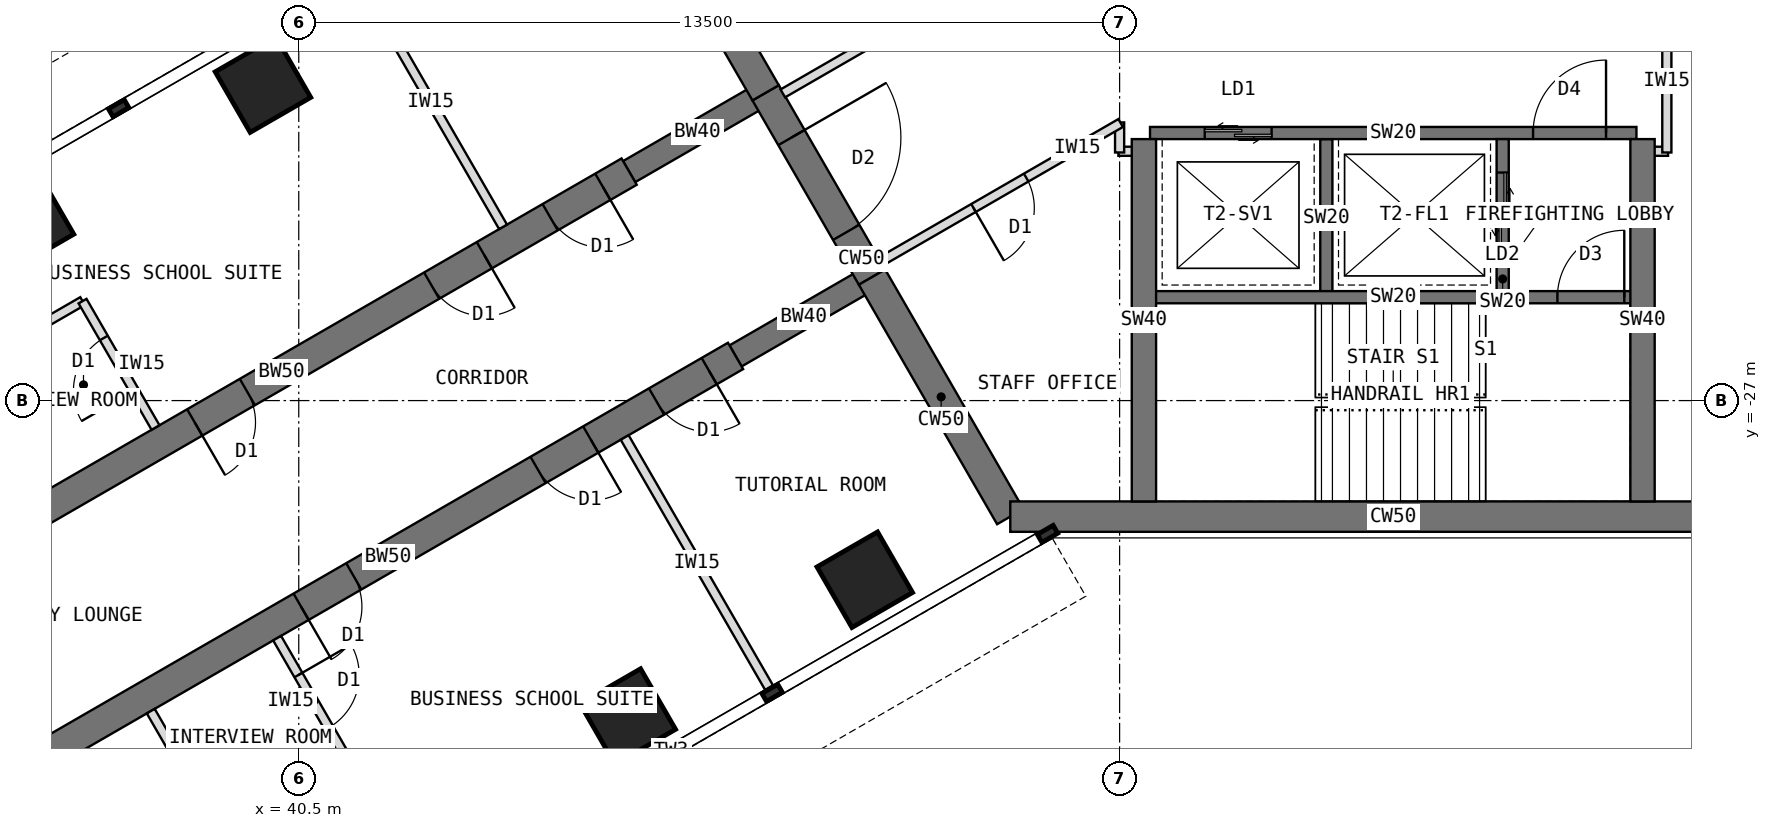
"""IFC4 building model, lengths in metres.
Left out: names, types, materials, properties, quantities, classifications, styles, units other than length and angle.
Written with IfcOpenShell. Run it as: python <this file> out.ifc"""

import sys

from ifc_helpers import new_model, si_unit, direction, frame, frame_2d, origin, origin_2d, place, context, subcontext, project, spatial, rectangle, extrude, element, fill, save


model = new_model("IFC4")
c1 = context("Model", 3, precision=1e-05, world=origin(), true_north=direction((0.0, 1.0)))
c2 = subcontext(c1, "Body", "Model", "MODEL_VIEW")
j1 = project(units=[si_unit("LENGTHUNIT", "METRE"), si_unit("PLANEANGLEUNIT", "RADIAN")], contexts=[c1])
p1 = place(None, origin())
s1 = spatial("IfcSite", under=j1, at=p1, CompositionType="ELEMENT")
p2 = place(p1, origin())
s2 = spatial("IfcBuilding", under=s1, at=p2, CompositionType="ELEMENT")
p3 = place(p2, frame((0.0, 0.0, 194.5)))
s3 = spatial("IfcBuildingStorey", under=s2, at=p3, CompositionType="ELEMENT", Elevation=194.5)
p4 = place(p3, frame((45.904, -18.0, 0.0), z_axis=(0.0, 0.0, 1.0), x_axis=(0.500024481964, -0.866011268655, 0.0)))
e1 = element("IfcWall", 1, at=p4, inside=s3, PredefinedType="SHEAR", context=c2, shape_type="SweptSolid", body=[
    extrude(rectangle(XDim=4.548, YDim=0.5, at=frame_2d((2.274, 0.0))), origin(), (0.0, 0.0, 1.0), 4.0),
])
p5 = place(p3, frame((48.178, -21.939, 0.0), z_axis=(0.0, 0.0, 1.0), x_axis=(0.500010275428, -0.866019471182, 0.0)))
e2 = element("IfcWall", 2, at=p5, inside=s3, PredefinedType="SHEAR", context=c2, shape_type="SweptSolid", body=[
    extrude(rectangle(XDim=3.5, YDim=0.5, at=frame_2d((1.75, 0.0))), origin(), (0.0, 0.0, 1.0), 4.0),
])
p6 = place(p5, frame((0.85, 0.0, 0.0)))
e3 = element("IfcOpeningElement", 3, at=p6, cuts=e2, PredefinedType="OPENING", context=c2, shape_type="SweptSolid", body=[
    extrude(rectangle(XDim=1.8, YDim=2.1, at=frame_2d((0.9, 1.05))), frame((0.0, 0.26, 0.0), z_axis=(0.0, -1.0, 0.0), x_axis=(1.0, 0.0, 0.0)), (0.0, 0.0, 1.0), 0.52),
])
p7 = place(p3, frame((49.928, -24.97, 0.0), z_axis=(0.0, 0.0, 1.0), x_axis=(0.499984222037, -0.866034513004, 0.0)))
e4 = element("IfcWall", 4, at=p7, inside=s3, PredefinedType="SHEAR", context=c2, shape_type="SweptSolid", body=[
    extrude(rectangle(XDim=4.548, YDim=0.5, at=frame_2d((2.274, 0.0))), origin(), (0.0, 0.0, 1.0), 4.0),
])
p8 = place(p3, frame((52.202, -28.908, 0.0), z_axis=(0.0, 0.0, 1.0), x_axis=(1.0, 0.0, 0.0)))
e5 = element("IfcWall", 5, at=p8, inside=s3, PredefinedType="SHEAR", context=c2, shape_type="SweptSolid", body=[
    extrude(rectangle(XDim=12.596, YDim=0.5, at=frame_2d((6.298, 0.0))), origin(), (0.0, 0.0, 1.0), 4.0),
])
p9 = place(p3, frame((49.928, -24.97, 0.0), z_axis=(0.0, 0.0, 1.0), x_axis=(-0.866031863473, -0.499988811324, 0.0)))
e6 = element("IfcWall", 6, at=p9, inside=s3, PredefinedType="SHEAR", context=c2, shape_type="SweptSolid", body=[
    extrude(rectangle(XDim=2.592, YDim=0.4, at=frame_2d((1.296, 0.0))), origin(), (0.0, 0.0, 1.0), 4.0),
])
p10 = place(p3, frame((47.684, -26.266, 0.0), z_axis=(0.0, 0.0, 1.0), x_axis=(-0.866027579429, -0.499996231654, 0.0)))
e7 = element("IfcWall", 7, at=p10, inside=s3, PredefinedType="SHEAR", context=c2, shape_type="SweptSolid", body=[
    extrude(rectangle(XDim=13.2, YDim=0.5, at=frame_2d((6.6, 0.0))), origin(), (0.0, 0.0, 1.0), 4.0),
])
p11 = place(p10, frame((0.5, 0.0, 0.0)))
e8 = element("IfcOpeningElement", 8, at=p11, cuts=e7, PredefinedType="OPENING", context=c2, shape_type="SweptSolid", body=[
    extrude(rectangle(XDim=1.0, YDim=2.1, at=frame_2d((0.5, 1.05))), frame((0.0, 0.26, 0.0), z_axis=(0.0, -1.0, 0.0), x_axis=(1.0, 0.0, 0.0)), (0.0, 0.0, 1.0), 0.52),
])
p12 = place(p10, frame((2.75, 0.0, 0.0)))
e9 = element("IfcOpeningElement", 9, at=p12, cuts=e7, PredefinedType="OPENING", context=c2, shape_type="SweptSolid", body=[
    extrude(rectangle(XDim=1.0, YDim=2.1, at=frame_2d((0.5, 1.05))), frame((0.0, 0.26, 0.0), z_axis=(0.0, -1.0, 0.0), x_axis=(1.0, 0.0, 0.0)), (0.0, 0.0, 1.0), 0.52),
])
p13 = place(p10, frame((7.25, 0.0, 0.0)))
e10 = element("IfcOpeningElement", 10, at=p13, cuts=e7, PredefinedType="OPENING", context=c2, shape_type="SweptSolid", body=[
    extrude(rectangle(XDim=1.0, YDim=2.1, at=frame_2d((0.5, 1.05))), frame((0.0, 0.26, 0.0), z_axis=(0.0, -1.0, 0.0), x_axis=(1.0, 0.0, 0.0)), (0.0, 0.0, 1.0), 0.52),
])
p14 = place(p3, frame((48.178, -21.939, 0.0), z_axis=(0.0, 0.0, 1.0), x_axis=(-0.866072649678, -0.499918158782, 0.0)))
e11 = element("IfcWall", 11, at=p14, inside=s3, PredefinedType="SHEAR", context=c2, shape_type="SweptSolid", body=[
    extrude(rectangle(XDim=2.592, YDim=0.4, at=frame_2d((1.296, 0.0))), origin(), (0.0, 0.0, 1.0), 4.0),
])
p15 = place(p3, frame((45.934, -23.234, 0.0), z_axis=(0.0, 0.0, 1.0), x_axis=(-0.866019570528, -0.500010103361, 0.0)))
e12 = element("IfcWall", 12, at=p15, inside=s3, PredefinedType="SHEAR", context=c2, shape_type="SweptSolid", body=[
    extrude(rectangle(XDim=13.2, YDim=0.5, at=frame_2d((6.6, 0.0))), origin(), (0.0, 0.0, 1.0), 4.0),
])
p16 = place(p15, frame((0.5, 0.0, 0.0)))
e13 = element("IfcOpeningElement", 13, at=p16, cuts=e12, PredefinedType="OPENING", context=c2, shape_type="SweptSolid", body=[
    extrude(rectangle(XDim=1.0, YDim=2.1, at=frame_2d((0.5, 1.05))), frame((0.0, 0.26, 0.0), z_axis=(0.0, -1.0, 0.0), x_axis=(1.0, 0.0, 0.0)), (0.0, 0.0, 1.0), 0.52),
])
p17 = place(p15, frame((2.75, 0.0, 0.0)))
e14 = element("IfcOpeningElement", 14, at=p17, cuts=e12, PredefinedType="OPENING", context=c2, shape_type="SweptSolid", body=[
    extrude(rectangle(XDim=1.0, YDim=2.1, at=frame_2d((0.5, 1.05))), frame((0.0, 0.26, 0.0), z_axis=(0.0, -1.0, 0.0), x_axis=(1.0, 0.0, 0.0)), (0.0, 0.0, 1.0), 0.52),
])
p18 = place(p15, frame((7.25, 0.0, 0.0)))
e15 = element("IfcOpeningElement", 15, at=p18, cuts=e12, PredefinedType="OPENING", context=c2, shape_type="SweptSolid", body=[
    extrude(rectangle(XDim=1.0, YDim=2.1, at=frame_2d((0.5, 1.05))), frame((0.0, 0.26, 0.0), z_axis=(0.0, -1.0, 0.0), x_axis=(1.0, 0.0, 0.0)), (0.0, 0.0, 1.0), 0.52),
])
for number, where, z_axis, x_axis in (
    (16, (49.809, -29.946, 0.0), (0.0, 0.0, 1.0), (0.866, 0.5, 0.0)),
    (17, (45.912, -32.196, 0.0), (0.0, 0.0, 1.0), (0.866, 0.5, 0.0)),
    (18, (39.912, -21.804, 0.0), (0.0, 0.0, 1.0), (0.866, 0.5, 0.0)),
    (19, (36.014, -24.054, 0.0), (0.0, 0.0, 1.0), (0.866, 0.5, 0.0)),
):
    element("IfcColumn", number, at=place(p3, frame(where, z_axis=z_axis, x_axis=x_axis)), inside=s3, PredefinedType="COLUMN", context=c2, shape_type="SweptSolid", body=[
        extrude(rectangle(XDim=1.15, YDim=1.15, at=origin_2d()), origin(), (0.0, 0.0, 1.0), 4.0),
    ])
p19 = place(p3, frame((54.5, -22.6, 0.0), z_axis=(0.0, 0.0, 1.0), x_axis=(1.0, 0.0, 0.0)))
e20 = element("IfcWall", 20, at=p19, inside=s3, PredefinedType="SHEAR", context=c2, shape_type="SweptSolid", body=[
    extrude(rectangle(XDim=8.0, YDim=0.2, at=frame_2d((4.0, 0.0))), origin(), (0.0, 0.0, 1.0), 4.0),
])
p20 = place(p19, frame((6.3, 0.0, 0.0)))
e21 = element("IfcOpeningElement", 21, at=p20, cuts=e20, PredefinedType="OPENING", context=c2, shape_type="SweptSolid", body=[
    extrude(rectangle(XDim=1.2, YDim=2.1, at=frame_2d((0.6, 1.05))), frame((0.0, 0.11, 0.0), z_axis=(0.0, -1.0, 0.0), x_axis=(1.0, 0.0, 0.0)), (0.0, 0.0, 1.0), 0.22),
])
p21 = place(p19, frame((0.9, 0.0, 0.0)))
e22 = element("IfcOpeningElement", 22, at=p21, cuts=e20, PredefinedType="OPENING", context=c2, shape_type="SweptSolid", body=[
    extrude(rectangle(XDim=1.1, YDim=2.2, at=frame_2d((0.55, 1.1))), frame((0.0, 0.11, 0.0), z_axis=(0.0, -1.0, 0.0), x_axis=(1.0, 0.0, 0.0)), (0.0, 0.0, 1.0), 0.22),
])
p22 = place(p3, frame((57.4, -22.7, 0.0), z_axis=(0.0, 0.0, 1.0), x_axis=(0.0, -1.0, 0.0)))
e23 = element("IfcWall", 23, at=p22, inside=s3, PredefinedType="SHEAR", context=c2, shape_type="SweptSolid", body=[
    extrude(rectangle(XDim=2.6, YDim=0.2, at=frame_2d((1.3, 0.0))), origin(), (0.0, 0.0, 1.0), 4.0),
])
p23 = place(p3, frame((60.3, -22.7, 0.0), z_axis=(0.0, 0.0, 1.0), x_axis=(0.0, -1.0, 0.0)))
e24 = element("IfcWall", 24, at=p23, inside=s3, PredefinedType="SHEAR", context=c2, shape_type="SweptSolid", body=[
    extrude(rectangle(XDim=2.6, YDim=0.2, at=frame_2d((1.3, 0.0))), origin(), (0.0, 0.0, 1.0), 4.0),
])
p24 = place(p23, frame((0.55, 0.0, 0.0)))
e25 = element("IfcOpeningElement", 25, at=p24, cuts=e24, PredefinedType="OPENING", context=c2, shape_type="SweptSolid", body=[
    extrude(rectangle(XDim=1.3, YDim=2.2, at=frame_2d((0.65, 1.1))), frame((0.0, 0.11, 0.0), z_axis=(0.0, -1.0, 0.0), x_axis=(1.0, 0.0, 0.0)), (0.0, 0.0, 1.0), 0.22),
])
p25 = place(p3, frame((54.5, -25.3, 0.0), z_axis=(0.0, 0.0, 1.0), x_axis=(1.0, 0.0, 0.0)))
e26 = element("IfcWall", 26, at=p25, inside=s3, PredefinedType="SHEAR", context=c2, shape_type="SweptSolid", body=[
    extrude(rectangle(XDim=8.0, YDim=0.2, at=frame_2d((4.0, 0.0))), origin(), (0.0, 0.0, 1.0), 4.0),
])
p26 = place(p25, frame((6.7, 0.0, 0.0)))
e27 = element("IfcOpeningElement", 27, at=p26, cuts=e26, PredefinedType="OPENING", context=c2, shape_type="SweptSolid", body=[
    extrude(rectangle(XDim=1.1, YDim=2.1, at=frame_2d((0.55, 1.05))), frame((0.0, 0.11, 0.0), z_axis=(0.0, -1.0, 0.0), x_axis=(1.0, 0.0, 0.0)), (0.0, 0.0, 1.0), 0.22),
])
for number, where, z_axis, x_axis in (
    (28, (62.6, -22.7, 0.0), (0.0, 0.0, 1.0), (0.0, -1.0, 0.0)),
    (29, (54.4, -22.7, 0.0), (0.0, 0.0, 1.0), (0.0, -1.0, 0.0)),
):
    element("IfcWall", number, at=place(p3, frame(where, z_axis=z_axis, x_axis=x_axis)), inside=s3, PredefinedType="SHEAR", context=c2, shape_type="SweptSolid", body=[
        extrude(rectangle(XDim=5.958, YDim=0.4, at=frame_2d((2.979, 0.0))), origin(), (0.0, 0.0, 1.0), 4.0),
    ])
p27 = place(p3, frame((45.86, -27.607, 0.0), z_axis=(0.0, 0.0, 1.0), x_axis=(0.499986429846, -0.866033238375, 0.0)))
e30 = element("IfcWall", 30, at=p27, inside=s3, PredefinedType="PARTITIONING", context=c2, shape_type="SweptSolid", body=[
    extrude(rectangle(XDim=4.75, YDim=0.15, at=frame_2d((2.375, 0.0))), origin(), (0.0, 0.0, 1.0), 3.8),
])
p28 = place(p3, frame((40.144, -30.907, 0.0), z_axis=(0.0, 0.0, 1.0), x_axis=(0.499957262057, -0.866050077142, 0.0)))
e31 = element("IfcWall", 31, at=p28, inside=s3, PredefinedType="PARTITIONING", context=c2, shape_type="SweptSolid", body=[
    extrude(rectangle(XDim=2.4, YDim=0.15, at=frame_2d((1.2, 0.0))), origin(), (0.0, 0.0, 1.0), 3.8),
])
p29 = place(p28, frame((0.7, 0.0, 0.0)))
e32 = element("IfcOpeningElement", 32, at=p29, cuts=e31, PredefinedType="OPENING", context=c2, shape_type="SweptSolid", body=[
    extrude(rectangle(XDim=1.0, YDim=2.1, at=frame_2d((0.5, 1.05))), frame((0.0, 0.085, 0.0), z_axis=(0.0, -1.0, 0.0), x_axis=(1.0, 0.0, 0.0)), (0.0, 0.0, 1.0), 0.17),
])
p30 = place(p3, frame((38.066, -32.107, 0.0), z_axis=(0.0, 0.0, 1.0), x_axis=(0.499957262057, -0.866050077142, 0.0)))
e33 = element("IfcWall", 33, at=p30, inside=s3, PredefinedType="PARTITIONING", context=c2, shape_type="SweptSolid", body=[
    extrude(rectangle(XDim=2.4, YDim=0.15, at=frame_2d((1.2, 0.0))), origin(), (0.0, 0.0, 1.0), 3.8),
])
p31 = place(p3, frame((43.86, -24.143, 0.0), z_axis=(0.0, 0.0, 1.0), x_axis=(-0.499986429846, 0.866033238375, 0.0)))
e34 = element("IfcWall", 34, at=p31, inside=s3, PredefinedType="PARTITIONING", context=c2, shape_type="SweptSolid", body=[
    extrude(rectangle(XDim=4.75, YDim=0.15, at=frame_2d((2.375, 0.0))), origin(), (0.0, 0.0, 1.0), 3.8),
])
p32 = place(p3, frame((36.944, -25.365, 0.0), z_axis=(0.0, 0.0, 1.0), x_axis=(-0.866024647952, -0.500001309137, 0.0)))
e35 = element("IfcWall", 35, at=p32, inside=s3, PredefinedType="PARTITIONING", context=c2, shape_type="SweptSolid", body=[
    extrude(rectangle(XDim=2.4, YDim=0.15, at=frame_2d((1.2, 0.0))), origin(), (0.0, 0.0, 1.0), 3.8),
])
p33 = place(p3, frame((38.144, -27.443, 0.0), z_axis=(0.0, 0.0, 1.0), x_axis=(-0.500001309137, 0.866024647952, 0.0)))
e36 = element("IfcWall", 36, at=p33, inside=s3, PredefinedType="PARTITIONING", context=c2, shape_type="SweptSolid", body=[
    extrude(rectangle(XDim=2.4, YDim=0.15, at=frame_2d((1.2, 0.0))), origin(), (0.0, 0.0, 1.0), 3.8),
])
p34 = place(p33, frame((0.7, 0.0, 0.0)))
e37 = element("IfcOpeningElement", 37, at=p34, cuts=e36, PredefinedType="OPENING", context=c2, shape_type="SweptSolid", body=[
    extrude(rectangle(XDim=1.0, YDim=2.1, at=frame_2d((0.5, 1.05))), frame((0.0, 0.085, 0.0), z_axis=(0.0, -1.0, 0.0), x_axis=(1.0, 0.0, 0.0)), (0.0, 0.0, 1.0), 0.17),
])
for number, where, z_axis, x_axis in (
    (38, (63.02, -22.9, 0.0), (0.0, 0.0, 1.0), (-1.0, 0.0, 0.0)),
    (39, (54.41, -22.9, 0.0), (0.0, 0.0, 1.0), (-1.0, 0.0, 0.0)),
):
    element("IfcWall", number, at=place(p3, frame(where, z_axis=z_axis, x_axis=x_axis)), inside=s3, PredefinedType="PARTITIONING", context=c2, shape_type="SweptSolid", body=[
        extrude(rectangle(XDim=0.43, YDim=0.15, at=frame_2d((0.215, 0.0))), origin(), (0.0, 0.0, 1.0), 3.8),
    ])
p35 = place(p3, frame((54.0, -22.92, 0.0), z_axis=(0.0, 0.0, 1.0), x_axis=(0.0, 1.0, 0.0)))
e40 = element("IfcWall", 40, at=p35, inside=s3, PredefinedType="PARTITIONING", context=c2, shape_type="SweptSolid", body=[
    extrude(rectangle(XDim=0.494, YDim=0.15, at=frame_2d((0.247, 0.0))), origin(), (0.0, 0.0, 1.0), 3.8),
])
p36 = place(p3, frame((54.017, -22.436, 0.0), z_axis=(0.0, 0.0, 1.0), x_axis=(-0.866024503882, -0.500001558674, 0.0)))
e41 = element("IfcWall", 41, at=p36, inside=s3, PredefinedType="PARTITIONING", context=c2, shape_type="SweptSolid", body=[
    extrude(rectangle(XDim=4.568, YDim=0.15, at=frame_2d((2.284, 0.0))), origin(), (0.0, 0.0, 1.0), 3.8),
])
p37 = place(p36, frame((1.794, 0.0, 0.0)))
e42 = element("IfcOpeningElement", 42, at=p37, cuts=e41, PredefinedType="OPENING", context=c2, shape_type="SweptSolid", body=[
    extrude(rectangle(XDim=1.0, YDim=2.1, at=frame_2d((0.5, 1.05))), frame((0.0, 0.085, 0.0), z_axis=(0.0, -1.0, 0.0), x_axis=(1.0, 0.0, 0.0)), (0.0, 0.0, 1.0), 0.17),
])
p38 = place(p3, frame((48.461, -21.948, 0.0), z_axis=(0.0, 0.0, 1.0), x_axis=(0.866024503882, 0.500001558674, 0.0)))
e43 = element("IfcWall", 43, at=p38, inside=s3, PredefinedType="PARTITIONING", context=c2, shape_type="SweptSolid", body=[
    extrude(rectangle(XDim=4.568, YDim=0.15, at=frame_2d((2.284, 0.0))), origin(), (0.0, 0.0, 1.0), 3.8),
])
p39 = place(p38, frame((1.774, 0.0, 0.0)))
e44 = element("IfcOpeningElement", 44, at=p39, cuts=e43, PredefinedType="OPENING", context=c2, shape_type="SweptSolid", body=[
    extrude(rectangle(XDim=1.0, YDim=2.1, at=frame_2d((0.5, 1.05))), frame((0.0, 0.085, 0.0), z_axis=(0.0, -1.0, 0.0), x_axis=(1.0, 0.0, 0.0)), (0.0, 0.0, 1.0), 0.17),
])
p40 = place(p3, frame((63.0, -20.578, 0.0), z_axis=(0.0, 0.0, 1.0), x_axis=(0.0, -1.0, 0.0)))
e45 = element("IfcWall", 45, at=p40, inside=s3, PredefinedType="PARTITIONING", context=c2, shape_type="SweptSolid", body=[
    extrude(rectangle(XDim=2.342, YDim=0.15, at=frame_2d((1.171, 0.0))), origin(), (0.0, 0.0, 1.0), 3.8),
])
p41 = place(p20, origin())
e46 = element("IfcDoor", 46, at=p41, inside=s3, OperationType="SINGLE_SWING_RIGHT", PredefinedType="DOOR", context=c2, shape_type="SweptSolid", body=[
    extrude(rectangle(XDim=1.2, YDim=2.1, at=frame_2d((0.6, 1.05))), frame((0.0, 0.025, 0.0), z_axis=(0.0, -1.0, 0.0), x_axis=(1.0, 0.0, 0.0)), (0.0, 0.0, 1.0), 0.05),
])
fill(e21, e46)
p42 = place(p24, origin())
e47 = element("IfcDoor", 47, at=p42, inside=s3, OperationType="DOUBLE_DOOR_SLIDING", PredefinedType="DOOR", context=c2, shape_type="SweptSolid", body=[
    extrude(rectangle(XDim=1.3, YDim=2.2, at=frame_2d((0.65, 1.1))), frame((0.0, 0.025, 0.0), z_axis=(0.0, -1.0, 0.0), x_axis=(1.0, 0.0, 0.0)), (0.0, 0.0, 1.0), 0.05),
])
fill(e25, e47)
p43 = place(p21, origin())
e48 = element("IfcDoor", 48, at=p43, inside=s3, OperationType="DOUBLE_DOOR_SLIDING", PredefinedType="DOOR", context=c2, shape_type="SweptSolid", body=[
    extrude(rectangle(XDim=1.1, YDim=2.2, at=frame_2d((0.55, 1.1))), frame((0.0, 0.025, 0.0), z_axis=(0.0, -1.0, 0.0), x_axis=(1.0, 0.0, 0.0)), (0.0, 0.0, 1.0), 0.05),
])
fill(e22, e48)
p44 = place(p26, origin())
e49 = element("IfcDoor", 49, at=p44, inside=s3, OperationType="SINGLE_SWING_RIGHT", PredefinedType="DOOR", context=c2, shape_type="SweptSolid", body=[
    extrude(rectangle(XDim=1.1, YDim=2.1, at=frame_2d((0.55, 1.05))), frame((0.0, 0.025, 0.0), z_axis=(0.0, -1.0, 0.0), x_axis=(1.0, 0.0, 0.0)), (0.0, 0.0, 1.0), 0.05),
])
fill(e27, e49)
p45 = place(p6, origin())
e50 = element("IfcDoor", 50, at=p45, inside=s3, OperationType="DOUBLE_DOOR_DOUBLE_SWING", PredefinedType="DOOR", context=c2, shape_type="SweptSolid", body=[
    extrude(rectangle(XDim=1.8, YDim=2.1, at=frame_2d((0.9, 1.05))), frame((0.0, 0.025, 0.0), z_axis=(0.0, -1.0, 0.0), x_axis=(1.0, 0.0, 0.0)), (0.0, 0.0, 1.0), 0.05),
])
fill(e3, e50)
p46 = place(p29, origin())
e51 = element("IfcDoor", 51, at=p46, inside=s3, OperationType="SINGLE_SWING_LEFT", PredefinedType="DOOR", context=c2, shape_type="SweptSolid", body=[
    extrude(rectangle(XDim=1.0, YDim=2.1, at=frame_2d((0.5, 1.05))), frame((0.0, 0.025, 0.0), z_axis=(0.0, -1.0, 0.0), x_axis=(1.0, 0.0, 0.0)), (0.0, 0.0, 1.0), 0.05),
])
fill(e32, e51)
p47 = place(p34, origin())
e52 = element("IfcDoor", 52, at=p47, inside=s3, OperationType="SINGLE_SWING_LEFT", PredefinedType="DOOR", context=c2, shape_type="SweptSolid", body=[
    extrude(rectangle(XDim=1.0, YDim=2.1, at=frame_2d((0.5, 1.05))), frame((0.0, 0.025, 0.0), z_axis=(0.0, -1.0, 0.0), x_axis=(1.0, 0.0, 0.0)), (0.0, 0.0, 1.0), 0.05),
])
fill(e37, e52)
p48 = place(p37, origin())
e53 = element("IfcDoor", 53, at=p48, inside=s3, OperationType="SINGLE_SWING_RIGHT", PredefinedType="DOOR", context=c2, shape_type="SweptSolid", body=[
    extrude(rectangle(XDim=1.0, YDim=2.1, at=frame_2d((0.5, 1.05))), frame((0.0, 0.025, 0.0), z_axis=(0.0, -1.0, 0.0), x_axis=(1.0, 0.0, 0.0)), (0.0, 0.0, 1.0), 0.05),
])
fill(e42, e53)
p49 = place(p11, origin())
e54 = element("IfcDoor", 54, at=p49, inside=s3, OperationType="SINGLE_SWING_LEFT", PredefinedType="DOOR", context=c2, shape_type="SweptSolid", body=[
    extrude(rectangle(XDim=1.0, YDim=2.1, at=frame_2d((0.5, 1.05))), frame((0.0, 0.025, 0.0), z_axis=(0.0, -1.0, 0.0), x_axis=(1.0, 0.0, 0.0)), (0.0, 0.0, 1.0), 0.05),
])
fill(e8, e54)
p50 = place(p12, origin())
e55 = element("IfcDoor", 55, at=p50, inside=s3, OperationType="SINGLE_SWING_LEFT", PredefinedType="DOOR", context=c2, shape_type="SweptSolid", body=[
    extrude(rectangle(XDim=1.0, YDim=2.1, at=frame_2d((0.5, 1.05))), frame((0.0, 0.025, 0.0), z_axis=(0.0, -1.0, 0.0), x_axis=(1.0, 0.0, 0.0)), (0.0, 0.0, 1.0), 0.05),
])
fill(e9, e55)
p51 = place(p13, origin())
e56 = element("IfcDoor", 56, at=p51, inside=s3, OperationType="SINGLE_SWING_RIGHT", PredefinedType="DOOR", context=c2, shape_type="SweptSolid", body=[
    extrude(rectangle(XDim=1.0, YDim=2.1, at=frame_2d((0.5, 1.05))), frame((0.0, 0.025, 0.0), z_axis=(0.0, -1.0, 0.0), x_axis=(1.0, 0.0, 0.0)), (0.0, 0.0, 1.0), 0.05),
])
fill(e10, e56)
p52 = place(p16, origin())
e57 = element("IfcDoor", 57, at=p52, inside=s3, OperationType="SINGLE_SWING_LEFT", PredefinedType="DOOR", context=c2, shape_type="SweptSolid", body=[
    extrude(rectangle(XDim=1.0, YDim=2.1, at=frame_2d((0.5, 1.05))), frame((0.0, 0.025, 0.0), z_axis=(0.0, -1.0, 0.0), x_axis=(1.0, 0.0, 0.0)), (0.0, 0.0, 1.0), 0.05),
])
fill(e13, e57)
p53 = place(p17, origin())
e58 = element("IfcDoor", 58, at=p53, inside=s3, OperationType="SINGLE_SWING_LEFT", PredefinedType="DOOR", context=c2, shape_type="SweptSolid", body=[
    extrude(rectangle(XDim=1.0, YDim=2.1, at=frame_2d((0.5, 1.05))), frame((0.0, 0.025, 0.0), z_axis=(0.0, -1.0, 0.0), x_axis=(1.0, 0.0, 0.0)), (0.0, 0.0, 1.0), 0.05),
])
fill(e14, e58)
p54 = place(p18, origin())
e59 = element("IfcDoor", 59, at=p54, inside=s3, OperationType="SINGLE_SWING_RIGHT", PredefinedType="DOOR", context=c2, shape_type="SweptSolid", body=[
    extrude(rectangle(XDim=1.0, YDim=2.1, at=frame_2d((0.5, 1.05))), frame((0.0, 0.025, 0.0), z_axis=(0.0, -1.0, 0.0), x_axis=(1.0, 0.0, 0.0)), (0.0, 0.0, 1.0), 0.05),
])
fill(e15, e59)
save(model, sys.argv[1])
